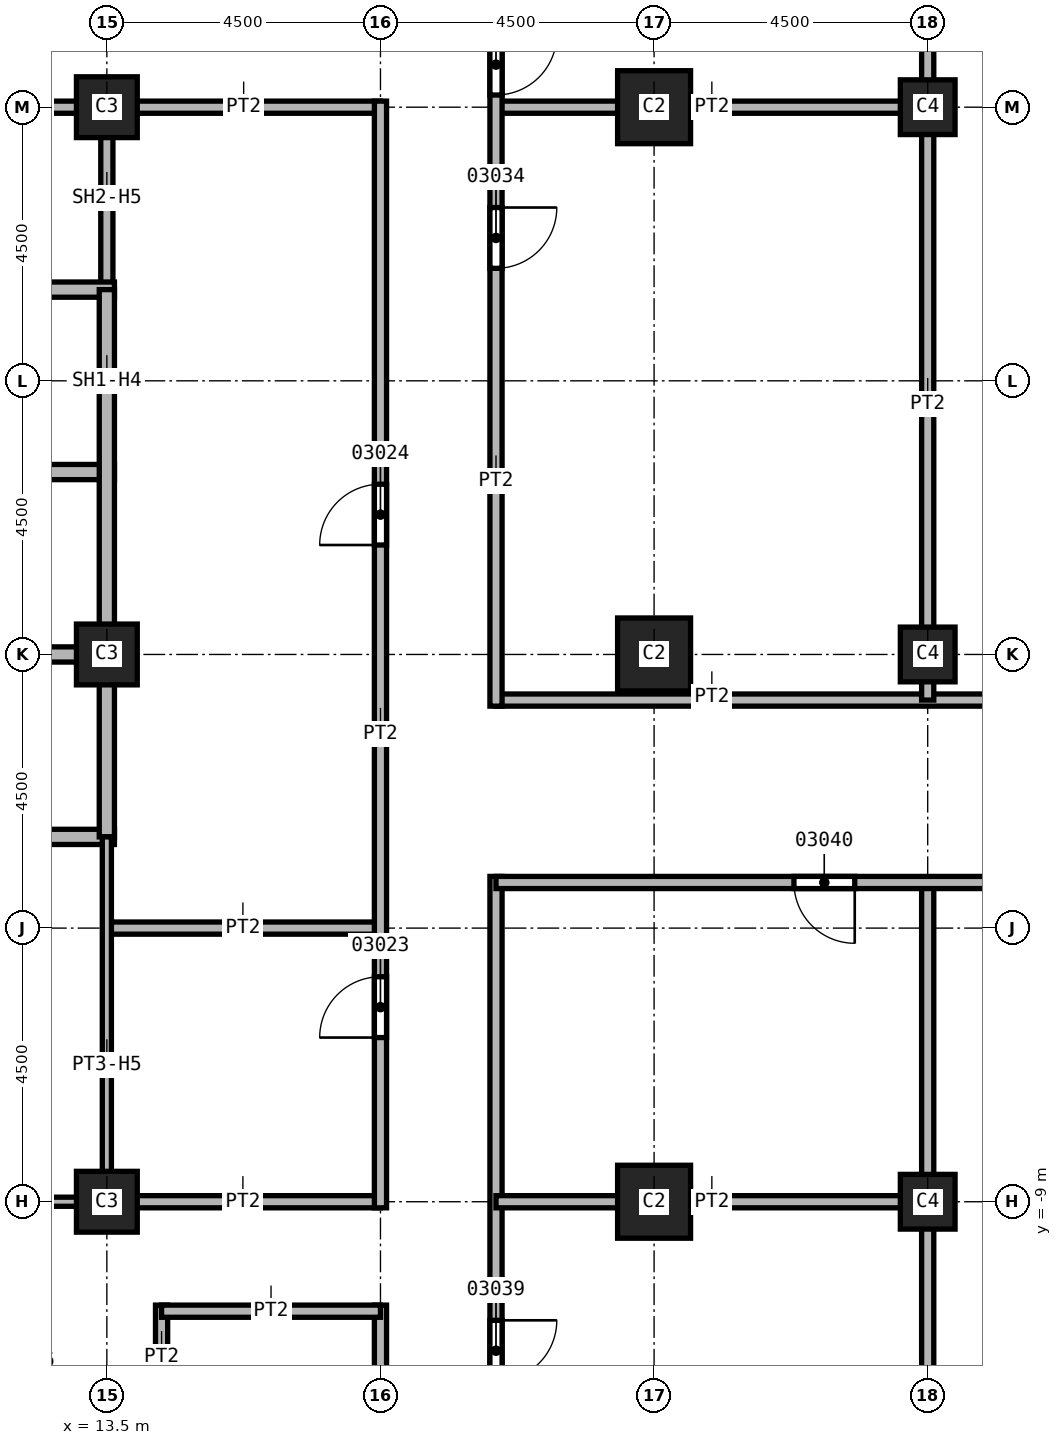
"""IFC4 building model, lengths in metres.
Left out: names, types, materials, properties, quantities, classifications, styles, units other than length and angle.
Written with IfcOpenShell. Run it as: python <this file> out.ifc"""

import sys

from ifc_helpers import new_model, si_unit, direction, frame, frame_2d, origin, origin_2d, place, context, subcontext, project, spatial, rectangle, extrude, element, fill, save


model = new_model("IFC4")
c1 = context("Model", 3, precision=1e-05, world=origin(), true_north=direction((0.0, 1.0)))
c2 = subcontext(c1, "Body", "Model", "MODEL_VIEW")
j1 = project(units=[si_unit("LENGTHUNIT", "METRE"), si_unit("PLANEANGLEUNIT", "RADIAN")], contexts=[c1])
p1 = place(None, origin())
s1 = spatial("IfcSite", under=j1, at=p1, CompositionType="ELEMENT")
p2 = place(p1, origin())
s2 = spatial("IfcBuilding", under=s1, at=p2, CompositionType="ELEMENT")
p3 = place(p2, frame((0.0, 0.0, 92.0)))
s3 = spatial("IfcBuildingStorey", under=s2, at=p3, CompositionType="ELEMENT", Elevation=92.0)
for number, where, z_axis, x_axis in (
    (1, (22.5, 0.0, 0.0), (0.0, 0.0, 1.0), (1.0, 0.0, 0.0)),
    (2, (22.5, 9.0, 0.0), (0.0, 0.0, 1.0), (1.0, 0.0, 0.0)),
    (3, (22.5, -9.0, 0.0), (0.0, 0.0, 1.0), (1.0, 0.0, 0.0)),
):
    element("IfcColumn", number, at=place(p3, frame(where, z_axis=z_axis, x_axis=x_axis)), inside=s3, PredefinedType="COLUMN", context=c2, shape_type="SweptSolid", body=[
        extrude(rectangle(XDim=1.2, YDim=1.2, at=origin_2d()), origin(), (0.0, 0.0, 1.0), 3.7),
    ])
for number, where, z_axis, x_axis in (
    (4, (13.5, 0.0, 0.0), (0.0, 0.0, 1.0), (1.0, 0.0, 0.0)),
    (5, (13.5, 9.0, 0.0), (0.0, 0.0, 1.0), (1.0, 0.0, 0.0)),
    (6, (13.5, -9.0, 0.0), (0.0, 0.0, 1.0), (1.0, 0.0, 0.0)),
):
    element("IfcColumn", number, at=place(p3, frame(where, z_axis=z_axis, x_axis=x_axis)), inside=s3, PredefinedType="COLUMN", context=c2, shape_type="SweptSolid", body=[
        extrude(rectangle(XDim=1.0, YDim=1.0, at=origin_2d()), origin(), (0.0, 0.0, 1.0), 3.7),
    ])
for number, where, z_axis, x_axis in (
    (7, (27.0, 0.0, 0.0), (0.0, 0.0, 1.0), (1.0, 0.0, 0.0)),
    (8, (27.0, 9.0, 0.0), (0.0, 0.0, 1.0), (1.0, 0.0, 0.0)),
    (9, (27.0, -9.0, 0.0), (0.0, 0.0, 1.0), (1.0, 0.0, 0.0)),
):
    element("IfcColumn", number, at=place(p3, frame(where, z_axis=z_axis, x_axis=x_axis)), inside=s3, PredefinedType="COLUMN", context=c2, shape_type="SweptSolid", body=[
        extrude(rectangle(XDim=0.9, YDim=0.9, at=origin_2d()), origin(), (0.0, 0.0, 1.0), 3.7),
    ])
for number, where, z_axis, x_axis in (
    (10, (13.5, -9.0, 0.0), (0.0, 0.0, 1.0), (1.0, 0.0, 0.0)),
    (11, (13.5, -4.5, 0.0), (0.0, 0.0, 1.0), (1.0, 0.0, 0.0)),
):
    element("IfcWall", number, at=place(p3, frame(where, z_axis=z_axis, x_axis=x_axis)), inside=s3, PredefinedType="PARTITIONING", context=c2, shape_type="SweptSolid", body=[
        extrude(rectangle(XDim=4.5, YDim=0.2, at=frame_2d((2.25, 0.0))), origin(), (0.0, 0.0, 1.0), 3.7),
    ])
p4 = place(p3, frame((14.4, -10.7, 0.0), z_axis=(0.0, 0.0, 1.0), x_axis=(0.0, -1.0, 0.0)))
e12 = element("IfcWall", 12, at=p4, inside=s3, PredefinedType="PARTITIONING", context=c2, shape_type="SweptSolid", body=[
    extrude(rectangle(XDim=1.7, YDim=0.2, at=frame_2d((0.85, 0.0))), origin(), (0.0, 0.0, 1.0), 3.7),
])
p5 = place(p3, frame((18.0, 9.0, 0.0), z_axis=(0.0, 0.0, 1.0), x_axis=(-1.0, 0.0, 0.0)))
e13 = element("IfcWall", 13, at=p5, inside=s3, PredefinedType="PARTITIONING", context=c2, shape_type="SweptSolid", body=[
    extrude(rectangle(XDim=4.5, YDim=0.2, at=frame_2d((2.25, 0.0))), origin(), (0.0, 0.0, 1.0), 3.7),
])
p6 = place(p3, frame((18.0, -24.2, 0.0), z_axis=(0.0, 0.0, 1.0), x_axis=(0.0, 1.0, 0.0)))
e14 = element("IfcWall", 14, at=p6, inside=s3, PredefinedType="PARTITIONING", context=c2, shape_type="SweptSolid", body=[
    extrude(rectangle(XDim=13.5, YDim=0.2, at=frame_2d((6.75, 0.0))), origin(), (0.0, 0.0, 1.0), 3.7),
])
p7 = place(p6, frame((8.2, 0.0, 0.0)))
e15 = element("IfcOpeningElement", 15, at=p7, cuts=e14, PredefinedType="OPENING", context=c2, shape_type="SweptSolid", body=[
    extrude(rectangle(XDim=1.0, YDim=2.1, at=frame_2d((0.5, 1.05))), frame((0.0, 0.1, 0.0), z_axis=(0.0, -1.0, 0.0), x_axis=(1.0, 0.0, 0.0)), (0.0, 0.0, 1.0), 0.2),
])
p8 = place(p3, frame((18.0, -10.8, 0.0), z_axis=(0.0, 0.0, 1.0), x_axis=(-1.0, 0.0, 0.0)))
e16 = element("IfcWall", 16, at=p8, inside=s3, PredefinedType="PARTITIONING", context=c2, shape_type="SweptSolid", body=[
    extrude(rectangle(XDim=3.6, YDim=0.2, at=frame_2d((1.8, 0.0))), origin(), (0.0, 0.0, 1.0), 3.7),
])
p9 = place(p3, frame((18.0, -9.1, 0.0), z_axis=(0.0, 0.0, 1.0), x_axis=(0.0, 1.0, 0.0)))
e17 = element("IfcWall", 17, at=p9, inside=s3, PredefinedType="PARTITIONING", context=c2, shape_type="SweptSolid", body=[
    extrude(rectangle(XDim=18.2, YDim=0.2, at=frame_2d((9.1, 0.0))), origin(), (0.0, 0.0, 1.0), 3.7),
])
p10 = place(p9, frame((2.8, 0.0, 0.0)))
e18 = element("IfcOpeningElement", 18, at=p10, cuts=e17, PredefinedType="OPENING", context=c2, shape_type="SweptSolid", body=[
    extrude(rectangle(XDim=1.0, YDim=2.1, at=frame_2d((0.5, 1.05))), frame((0.0, 0.1, 0.0), z_axis=(0.0, -1.0, 0.0), x_axis=(1.0, 0.0, 0.0)), (0.0, 0.0, 1.0), 0.2),
])
p11 = place(p9, frame((10.9, 0.0, 0.0)))
e19 = element("IfcOpeningElement", 19, at=p11, cuts=e17, PredefinedType="OPENING", context=c2, shape_type="SweptSolid", body=[
    extrude(rectangle(XDim=1.0, YDim=2.1, at=frame_2d((0.5, 1.05))), frame((0.0, 0.1, 0.0), z_axis=(0.0, -1.0, 0.0), x_axis=(1.0, 0.0, 0.0)), (0.0, 0.0, 1.0), 0.2),
])
p12 = place(p3, frame((19.9, -3.65, 0.0), z_axis=(0.0, 0.0, 1.0), x_axis=(0.0, -1.0, 0.0)))
e20 = element("IfcWall", 20, at=p12, inside=s3, PredefinedType="PARTITIONING", context=c2, shape_type="SweptSolid", body=[
    extrude(rectangle(XDim=20.85, YDim=0.2, at=frame_2d((10.425, 0.0))), origin(), (0.0, 0.0, 1.0), 3.7),
])
p13 = place(p12, frame((17.05, 0.0, 0.0)))
e21 = element("IfcOpeningElement", 21, at=p13, cuts=e20, PredefinedType="OPENING", context=c2, shape_type="SweptSolid", body=[
    extrude(rectangle(XDim=1.0, YDim=2.1, at=frame_2d((0.5, 1.05))), frame((0.0, 0.1, 0.0), z_axis=(0.0, -1.0, 0.0), x_axis=(1.0, 0.0, 0.0)), (0.0, 0.0, 1.0), 0.2),
])
p14 = place(p12, frame((7.3, 0.0, 0.0)))
e22 = element("IfcOpeningElement", 22, at=p14, cuts=e20, PredefinedType="OPENING", context=c2, shape_type="SweptSolid", body=[
    extrude(rectangle(XDim=1.0, YDim=2.1, at=frame_2d((0.5, 1.05))), frame((0.0, 0.1, 0.0), z_axis=(0.0, -1.0, 0.0), x_axis=(1.0, 0.0, 0.0)), (0.0, 0.0, 1.0), 0.2),
])
p15 = place(p3, frame((19.9, -9.0, 0.0), z_axis=(0.0, 0.0, 1.0), x_axis=(1.0, 0.0, 0.0)))
e23 = element("IfcWall", 23, at=p15, inside=s3, PredefinedType="PARTITIONING", context=c2, shape_type="SweptSolid", body=[
    extrude(rectangle(XDim=7.2, YDim=0.2, at=frame_2d((3.6, 0.0))), origin(), (0.0, 0.0, 1.0), 3.7),
])
p16 = place(p3, frame((19.9, -0.75, 0.0), z_axis=(0.0, 0.0, 1.0), x_axis=(1.0, 0.0, 0.0)))
e24 = element("IfcWall", 24, at=p16, inside=s3, PredefinedType="PARTITIONING", context=c2, shape_type="SweptSolid", body=[
    extrude(rectangle(XDim=13.95, YDim=0.2, at=frame_2d((6.975, 0.0))), origin(), (0.0, 0.0, 1.0), 3.7),
])
p17 = place(p3, frame((19.9, 9.0, 0.0), z_axis=(0.0, 0.0, 1.0), x_axis=(1.0, 0.0, 0.0)))
e25 = element("IfcWall", 25, at=p17, inside=s3, PredefinedType="PARTITIONING", context=c2, shape_type="SweptSolid", body=[
    extrude(rectangle(XDim=7.2, YDim=0.2, at=frame_2d((3.6, 0.0))), origin(), (0.0, 0.0, 1.0), 3.7),
])
p18 = place(p3, frame((19.9, 24.5, 0.0), z_axis=(0.0, 0.0, 1.0), x_axis=(0.0, -1.0, 0.0)))
e26 = element("IfcWall", 26, at=p18, inside=s3, PredefinedType="PARTITIONING", context=c2, shape_type="SweptSolid", body=[
    extrude(rectangle(XDim=25.35, YDim=0.2, at=frame_2d((12.675, 0.0))), origin(), (0.0, 0.0, 1.0), 3.7),
])
p19 = place(p18, frame((17.15, 0.0, 0.0)))
e27 = element("IfcOpeningElement", 27, at=p19, cuts=e26, PredefinedType="OPENING", context=c2, shape_type="SweptSolid", body=[
    extrude(rectangle(XDim=1.0, YDim=2.1, at=frame_2d((0.5, 1.05))), frame((0.0, 0.1, 0.0), z_axis=(0.0, -1.0, 0.0), x_axis=(1.0, 0.0, 0.0)), (0.0, 0.0, 1.0), 0.2),
])
p20 = place(p18, frame((14.3, 0.0, 0.0)))
e28 = element("IfcOpeningElement", 28, at=p20, cuts=e26, PredefinedType="OPENING", context=c2, shape_type="SweptSolid", body=[
    extrude(rectangle(XDim=1.0, YDim=2.1, at=frame_2d((0.5, 1.05))), frame((0.0, 0.1, 0.0), z_axis=(0.0, -1.0, 0.0), x_axis=(1.0, 0.0, 0.0)), (0.0, 0.0, 1.0), 0.2),
])
p21 = place(p18, frame((9.8, 0.0, 0.0)))
e29 = element("IfcOpeningElement", 29, at=p21, cuts=e26, PredefinedType="OPENING", context=c2, shape_type="SweptSolid", body=[
    extrude(rectangle(XDim=1.0, YDim=2.1, at=frame_2d((0.5, 1.05))), frame((0.0, 0.1, 0.0), z_axis=(0.0, -1.0, 0.0), x_axis=(1.0, 0.0, 0.0)), (0.0, 0.0, 1.0), 0.2),
])
p22 = place(p18, frame((3.7, 0.0, 0.0)))
e30 = element("IfcOpeningElement", 30, at=p22, cuts=e26, PredefinedType="OPENING", context=c2, shape_type="SweptSolid", body=[
    extrude(rectangle(XDim=1.0, YDim=2.1, at=frame_2d((0.5, 1.05))), frame((0.0, 0.1, 0.0), z_axis=(0.0, -1.0, 0.0), x_axis=(1.0, 0.0, 0.0)), (0.0, 0.0, 1.0), 0.2),
])
p23 = place(p3, frame((27.0, -3.75, 0.0), z_axis=(0.0, 0.0, 1.0), x_axis=(0.0, -1.0, 0.0)))
e31 = element("IfcWall", 31, at=p23, inside=s3, PredefinedType="PARTITIONING", context=c2, shape_type="SweptSolid", body=[
    extrude(rectangle(XDim=13.65, YDim=0.2, at=frame_2d((6.825, 0.0))), origin(), (0.0, 0.0, 1.0), 3.7),
])
p24 = place(p3, frame((27.0, 17.4, 0.0), z_axis=(0.0, 0.0, 1.0), x_axis=(0.0, -1.0, 0.0)))
e32 = element("IfcWall", 32, at=p24, inside=s3, PredefinedType="PARTITIONING", context=c2, shape_type="SweptSolid", body=[
    extrude(rectangle(XDim=18.15, YDim=0.2, at=frame_2d((9.075, 0.0))), origin(), (0.0, 0.0, 1.0), 3.7),
])
p25 = place(p3, frame((33.85, -3.75, 0.0), z_axis=(0.0, 0.0, 1.0), x_axis=(-1.0, 0.0, 0.0)))
e33 = element("IfcWall", 33, at=p25, inside=s3, PredefinedType="PARTITIONING", context=c2, shape_type="SweptSolid", body=[
    extrude(rectangle(XDim=13.95, YDim=0.2, at=frame_2d((6.975, 0.0))), origin(), (0.0, 0.0, 1.0), 3.7),
])
p26 = place(p25, frame((8.05, 0.0, 0.0)))
e34 = element("IfcOpeningElement", 34, at=p26, cuts=e33, PredefinedType="OPENING", context=c2, shape_type="SweptSolid", body=[
    extrude(rectangle(XDim=1.0, YDim=2.1, at=frame_2d((0.5, 1.05))), frame((0.0, 0.1, 0.0), z_axis=(0.0, -1.0, 0.0), x_axis=(1.0, 0.0, 0.0)), (0.0, 0.0, 1.0), 0.2),
])
for number, where, z_axis, x_axis in (
    (35, (10.5, 9.0, 0.0), (0.0, 0.0, 1.0), (1.0, 0.0, 0.0)),
    (36, (13.5, 9.1, 0.0), (0.0, 0.0, 1.0), (0.0, -1.0, 0.0)),
):
    element("IfcWall", number, at=place(p3, frame(where, z_axis=z_axis, x_axis=x_axis)), inside=s3, PredefinedType="SOLIDWALL", context=c2, shape_type="SweptSolid", body=[
        extrude(rectangle(XDim=3.1, YDim=0.2, at=frame_2d((1.55, 0.0))), origin(), (0.0, 0.0, 1.0), 2.938),
    ])
p27 = place(p3, frame((4.375, 3.0, 0.0), z_axis=(0.0, 0.0, 1.0), x_axis=(1.0, 0.0, 0.0)))
e37 = element("IfcWall", 37, at=p27, inside=s3, PredefinedType="SOLIDWALL", context=c2, shape_type="SweptSolid", body=[
    extrude(rectangle(XDim=9.25, YDim=0.25, at=frame_2d((4.625, 0.0))), origin(), (0.0, 0.0, 1.0), 3.7),
])
p28 = place(p27, frame((4.125, 0.0, 0.0)))
e38 = element("IfcOpeningElement", 38, at=p28, cuts=e37, PredefinedType="OPENING", context=c2, shape_type="SweptSolid", body=[
    extrude(rectangle(XDim=1.1, YDim=2.1, at=frame_2d((0.55, 1.05))), frame((0.0, 0.125, 0.0), z_axis=(0.0, -1.0, 0.0), x_axis=(1.0, 0.0, 0.0)), (0.0, 0.0, 1.0), 0.25),
])
p29 = place(p3, frame((7.5, -3.0, 0.0), z_axis=(0.0, 0.0, 1.0), x_axis=(1.0, 0.0, 0.0)))
e39 = element("IfcWall", 39, at=p29, inside=s3, PredefinedType="SOLIDWALL", context=c2, shape_type="SweptSolid", body=[
    extrude(rectangle(XDim=6.125, YDim=0.25, at=frame_2d((3.062, 0.0))), origin(), (0.0, 0.0, 1.0), 3.7),
])
p30 = place(p29, frame((1.0, 0.0, 0.0)))
e40 = element("IfcOpeningElement", 40, at=p30, cuts=e39, PredefinedType="OPENING", context=c2, shape_type="SweptSolid", body=[
    extrude(rectangle(XDim=1.1, YDim=2.1, at=frame_2d((0.55, 1.05))), frame((0.0, 0.125, 0.0), z_axis=(0.0, -1.0, 0.0), x_axis=(1.0, 0.0, 0.0)), (0.0, 0.0, 1.0), 0.25),
])
for number, where, z_axis, x_axis in (
    (41, (10.5, 0.0, 0.0), (0.0, 0.0, 1.0), (1.0, 0.0, 0.0)),
    (42, (10.5, 6.0, 0.0), (0.0, 0.0, 1.0), (1.0, 0.0, 0.0)),
):
    element("IfcWall", number, at=place(p3, frame(where, z_axis=z_axis, x_axis=x_axis)), inside=s3, PredefinedType="SOLIDWALL", context=c2, shape_type="SweptSolid", body=[
        extrude(rectangle(XDim=3.125, YDim=0.25, at=frame_2d((1.562, 0.0))), origin(), (0.0, 0.0, 1.0), 3.7),
    ])
p31 = place(p3, frame((13.5, 6.0, 0.0), z_axis=(0.0, 0.0, 1.0), x_axis=(0.0, -1.0, 0.0)))
e43 = element("IfcWall", 43, at=p31, inside=s3, PredefinedType="SOLIDWALL", context=c2, shape_type="SweptSolid", body=[
    extrude(rectangle(XDim=9.0, YDim=0.25, at=frame_2d((4.5, 0.0))), origin(), (0.0, 0.0, 1.0), 2.938),
])
p32 = place(p3, frame((13.5, -3.0, 0.0), z_axis=(0.0, 0.0, 1.0), x_axis=(0.0, -1.0, 0.0)))
e44 = element("IfcWall", 44, at=p32, inside=s3, PredefinedType="PARTITIONING", context=c2, shape_type="SweptSolid", body=[
    extrude(rectangle(XDim=6.1, YDim=0.15, at=frame_2d((3.05, 0.0))), origin(), (0.0, 0.0, 1.0), 2.938),
])
p33 = place(p3, frame((13.575, -9.0, 0.0), z_axis=(0.0, 0.0, 1.0), x_axis=(-1.0, 0.0, 0.0)))
e45 = element("IfcWall", 45, at=p33, inside=s3, PredefinedType="PARTITIONING", context=c2, shape_type="SweptSolid", body=[
    extrude(rectangle(XDim=3.075, YDim=0.15, at=frame_2d((1.538, 0.0))), origin(), (0.0, 0.0, 1.0), 2.938),
])
p34 = place(p10, origin())
e46 = element("IfcDoor", 46, at=p34, inside=s3, OperationType="SINGLE_SWING_RIGHT", PredefinedType="DOOR", context=c2, shape_type="SweptSolid", body=[
    extrude(rectangle(XDim=1.0, YDim=2.1, at=frame_2d((0.5, 1.05))), frame((0.0, 0.025, 0.0), z_axis=(0.0, -1.0, 0.0), x_axis=(1.0, 0.0, 0.0)), (0.0, 0.0, 1.0), 0.05),
])
fill(e18, e46)
p35 = place(p11, origin())
e47 = element("IfcDoor", 47, at=p35, inside=s3, OperationType="SINGLE_SWING_LEFT", PredefinedType="DOOR", context=c2, shape_type="SweptSolid", body=[
    extrude(rectangle(XDim=1.0, YDim=2.1, at=frame_2d((0.5, 1.05))), frame((0.0, 0.025, 0.0), z_axis=(0.0, -1.0, 0.0), x_axis=(1.0, 0.0, 0.0)), (0.0, 0.0, 1.0), 0.05),
])
fill(e19, e47)
p36 = place(p19, origin())
e48 = element("IfcDoor", 48, at=p36, inside=s3, OperationType="SINGLE_SWING_LEFT", PredefinedType="DOOR", context=c2, shape_type="SweptSolid", body=[
    extrude(rectangle(XDim=1.0, YDim=2.1, at=frame_2d((0.5, 1.05))), frame((0.0, 0.025, 0.0), z_axis=(0.0, -1.0, 0.0), x_axis=(1.0, 0.0, 0.0)), (0.0, 0.0, 1.0), 0.05),
])
fill(e27, e48)
p37 = place(p20, origin())
e49 = element("IfcDoor", 49, at=p37, inside=s3, OperationType="SINGLE_SWING_RIGHT", PredefinedType="DOOR", context=c2, shape_type="SweptSolid", body=[
    extrude(rectangle(XDim=1.0, YDim=2.1, at=frame_2d((0.5, 1.05))), frame((0.0, 0.025, 0.0), z_axis=(0.0, -1.0, 0.0), x_axis=(1.0, 0.0, 0.0)), (0.0, 0.0, 1.0), 0.05),
])
fill(e28, e49)
p38 = place(p14, origin())
e50 = element("IfcDoor", 50, at=p38, inside=s3, OperationType="SINGLE_SWING_RIGHT", PredefinedType="DOOR", context=c2, shape_type="SweptSolid", body=[
    extrude(rectangle(XDim=1.0, YDim=2.1, at=frame_2d((0.5, 1.05))), frame((0.0, 0.025, 0.0), z_axis=(0.0, -1.0, 0.0), x_axis=(1.0, 0.0, 0.0)), (0.0, 0.0, 1.0), 0.05),
])
fill(e22, e50)
p39 = place(p26, origin())
e51 = element("IfcDoor", 51, at=p39, inside=s3, OperationType="SINGLE_SWING_LEFT", PredefinedType="DOOR", context=c2, shape_type="SweptSolid", body=[
    extrude(rectangle(XDim=1.0, YDim=2.1, at=frame_2d((0.5, 1.05))), frame((0.0, 0.025, 0.0), z_axis=(0.0, -1.0, 0.0), x_axis=(1.0, 0.0, 0.0)), (0.0, 0.0, 1.0), 0.05),
])
fill(e34, e51)
save(model, sys.argv[1])
